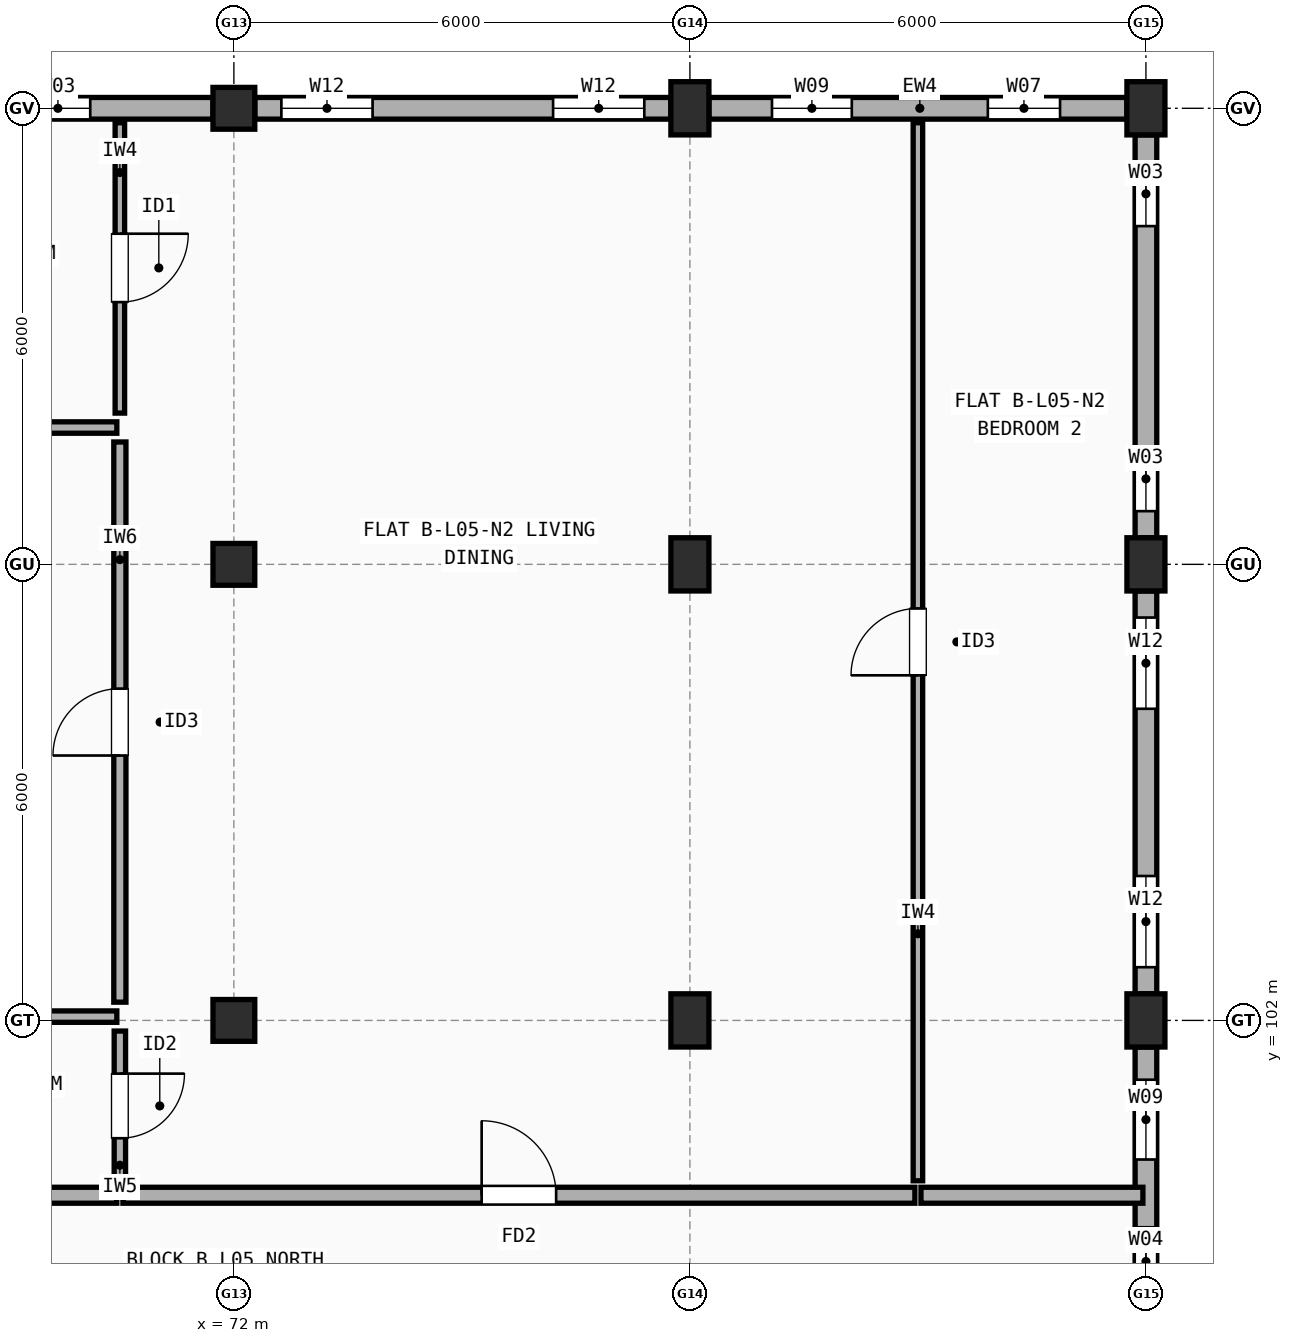
"""IFC4 building model, lengths in metres.
Left out: names, types, materials, properties, quantities, classifications, styles, units other than length and angle.
Written with IfcOpenShell. Run it as: python <this file> out.ifc"""

import sys

from ifc_helpers import new_model, si_unit, direction, frame, frame_2d, origin, origin_2d, place, context, subcontext, project, spatial, rectangle, extrude, element, fill, save


model = new_model("IFC4")
c1 = context("Model", 3, precision=1e-05, world=origin(), true_north=direction((0.0, 1.0)))
c2 = subcontext(c1, "Body", "Model", "MODEL_VIEW")
j1 = project(units=[si_unit("LENGTHUNIT", "METRE"), si_unit("PLANEANGLEUNIT", "RADIAN")], contexts=[c1])
p1 = place(None, origin())
s1 = spatial("IfcSite", under=j1, at=p1, CompositionType="ELEMENT")
p2 = place(p1, origin())
s2 = spatial("IfcBuilding", under=s1, at=p2, CompositionType="ELEMENT")
p3 = place(p2, frame((0.0, 0.0, 17.3)))
s3 = spatial("IfcBuildingStorey", under=s2, at=p3, CompositionType="ELEMENT", Elevation=17.3)
for number, where, z_axis, x_axis in (
    (1, (72.0, 102.0, 0.0), (0.0, 0.0, 1.0), (1.0, 0.0, 0.0)),
    (2, (72.0, 108.0, 0.0), (0.0, 0.0, 1.0), (1.0, 0.0, 0.0)),
    (3, (72.0, 114.0, 0.0), (0.0, 0.0, 1.0), (1.0, 0.0, 0.0)),
):
    element("IfcColumn", number, at=place(p3, frame(where, z_axis=z_axis, x_axis=x_axis)), inside=s3, PredefinedType="COLUMN", context=c2, shape_type="SweptSolid", body=[
        extrude(rectangle(XDim=0.55, YDim=0.55, at=origin_2d()), origin(), (0.0, 0.0, 1.0), 2.965),
    ])
for number, where, z_axis, x_axis in (
    (4, (78.0, 102.0, 0.0), (0.0, 0.0, 1.0), (1.0, 0.0, 0.0)),
    (5, (78.0, 108.0, 0.0), (0.0, 0.0, 1.0), (1.0, 0.0, 0.0)),
    (6, (78.0, 114.0, 0.0), (0.0, 0.0, 1.0), (1.0, 0.0, 0.0)),
    (7, (84.0, 102.0, 0.0), (0.0, 0.0, 1.0), (1.0, 0.0, 0.0)),
    (8, (84.0, 108.0, 0.0), (0.0, 0.0, 1.0), (1.0, 0.0, 0.0)),
    (9, (84.0, 114.0, 0.0), (0.0, 0.0, 1.0), (1.0, 0.0, 0.0)),
):
    element("IfcColumn", number, at=place(p3, frame(where, z_axis=z_axis, x_axis=x_axis)), inside=s3, PredefinedType="COLUMN", context=c2, shape_type="SweptSolid", body=[
        extrude(rectangle(XDim=0.5, YDim=0.7, at=origin_2d()), origin(), (0.0, 0.0, 1.0), 2.965),
    ])
p4 = place(p3, frame((84.0, 96.35, 0.0), z_axis=(0.0, 0.0, 1.0), x_axis=(0.0, 1.0, 0.0)))
e10 = element("IfcWall", 10, at=p4, inside=s3, PredefinedType="STANDARD", context=c2, shape_type="SweptSolid", body=[
    extrude(rectangle(XDim=5.3, YDim=0.285, at=frame_2d((2.65, 0.0))), origin(), (0.0, 0.0, 1.0), 2.447),
])
p5 = place(p4, frame((2.029, 0.0, 0.9)))
e11 = element("IfcOpeningElement", 11, at=p5, cuts=e10, PredefinedType="OPENING", context=c2, shape_type="SweptSolid", body=[
    extrude(rectangle(XDim=0.9, YDim=1.3, at=frame_2d((0.45, 0.65))), frame((0.0, 0.152, 0.0), z_axis=(0.0, -1.0, 0.0), x_axis=(1.0, 0.0, 0.0)), (0.0, 0.0, 1.0), 0.305),
])
p6 = place(p4, frame((3.82, 0.0, 0.9)))
e12 = element("IfcOpeningElement", 12, at=p6, cuts=e10, PredefinedType="OPENING", context=c2, shape_type="SweptSolid", body=[
    extrude(rectangle(XDim=1.05, YDim=1.35, at=frame_2d((0.525, 0.675))), frame((0.0, 0.152, 0.0), z_axis=(0.0, -1.0, 0.0), x_axis=(1.0, 0.0, 0.0)), (0.0, 0.0, 1.0), 0.305),
])
p7 = place(p3, frame((84.0, 102.35, 0.0), z_axis=(0.0, 0.0, 1.0), x_axis=(0.0, 1.0, 0.0)))
e13 = element("IfcWall", 13, at=p7, inside=s3, PredefinedType="STANDARD", context=c2, shape_type="SweptSolid", body=[
    extrude(rectangle(XDim=5.3, YDim=0.285, at=frame_2d((2.65, 0.0))), origin(), (0.0, 0.0, 1.0), 2.447),
])
p8 = place(p7, frame((0.35, 0.0, 0.9)))
e14 = element("IfcOpeningElement", 14, at=p8, cuts=e13, PredefinedType="OPENING", context=c2, shape_type="SweptSolid", body=[
    extrude(rectangle(XDim=1.2, YDim=1.35, at=frame_2d((0.6, 0.675))), frame((0.0, 0.152, 0.0), z_axis=(0.0, -1.0, 0.0), x_axis=(1.0, 0.0, 0.0)), (0.0, 0.0, 1.0), 0.305),
])
p9 = place(p7, frame((3.75, 0.0, 0.9)))
e15 = element("IfcOpeningElement", 15, at=p9, cuts=e13, PredefinedType="OPENING", context=c2, shape_type="SweptSolid", body=[
    extrude(rectangle(XDim=1.2, YDim=1.35, at=frame_2d((0.6, 0.675))), frame((0.0, 0.152, 0.0), z_axis=(0.0, -1.0, 0.0), x_axis=(1.0, 0.0, 0.0)), (0.0, 0.0, 1.0), 0.305),
])
p10 = place(p3, frame((84.0, 108.35, 0.0), z_axis=(0.0, 0.0, 1.0), x_axis=(0.0, 1.0, 0.0)))
e16 = element("IfcWall", 16, at=p10, inside=s3, PredefinedType="STANDARD", context=c2, shape_type="SweptSolid", body=[
    extrude(rectangle(XDim=5.3, YDim=0.285, at=frame_2d((2.65, 0.0))), origin(), (0.0, 0.0, 1.0), 2.447),
])
p11 = place(p10, frame((0.35, 0.0, 0.9)))
e17 = element("IfcOpeningElement", 17, at=p11, cuts=e16, PredefinedType="OPENING", context=c2, shape_type="SweptSolid", body=[
    extrude(rectangle(XDim=0.85, YDim=1.25, at=frame_2d((0.425, 0.625))), frame((0.0, 0.152, 0.0), z_axis=(0.0, -1.0, 0.0), x_axis=(1.0, 0.0, 0.0)), (0.0, 0.0, 1.0), 0.305),
])
p12 = place(p10, frame((4.1, 0.0, 0.9)))
e18 = element("IfcOpeningElement", 18, at=p12, cuts=e16, PredefinedType="OPENING", context=c2, shape_type="SweptSolid", body=[
    extrude(rectangle(XDim=0.85, YDim=1.25, at=frame_2d((0.425, 0.625))), frame((0.0, 0.152, 0.0), z_axis=(0.0, -1.0, 0.0), x_axis=(1.0, 0.0, 0.0)), (0.0, 0.0, 1.0), 0.305),
])
p13 = place(p3, frame((83.75, 114.0, 0.0), z_axis=(0.0, 0.0, 1.0), x_axis=(-1.0, 0.0, 0.0)))
e19 = element("IfcWall", 19, at=p13, inside=s3, PredefinedType="STANDARD", context=c2, shape_type="SweptSolid", body=[
    extrude(rectangle(XDim=5.5, YDim=0.285, at=frame_2d((2.75, 0.0))), origin(), (0.0, 0.0, 1.0), 2.447),
])
p14 = place(p13, frame((0.88, 0.0, 0.9)))
e20 = element("IfcOpeningElement", 20, at=p14, cuts=e19, PredefinedType="OPENING", context=c2, shape_type="SweptSolid", body=[
    extrude(rectangle(XDim=0.95, YDim=1.35, at=frame_2d((0.475, 0.675))), frame((0.0, 0.152, 0.0), z_axis=(0.0, -1.0, 0.0), x_axis=(1.0, 0.0, 0.0)), (0.0, 0.0, 1.0), 0.305),
])
p15 = place(p13, frame((3.62, 0.0, 0.9)))
e21 = element("IfcOpeningElement", 21, at=p15, cuts=e19, PredefinedType="OPENING", context=c2, shape_type="SweptSolid", body=[
    extrude(rectangle(XDim=1.05, YDim=1.35, at=frame_2d((0.525, 0.675))), frame((0.0, 0.152, 0.0), z_axis=(0.0, -1.0, 0.0), x_axis=(1.0, 0.0, 0.0)), (0.0, 0.0, 1.0), 0.305),
])
p16 = place(p3, frame((77.75, 114.0, 0.0), z_axis=(0.0, 0.0, 1.0), x_axis=(-1.0, 0.0, 0.0)))
e22 = element("IfcWall", 22, at=p16, inside=s3, PredefinedType="STANDARD", context=c2, shape_type="SweptSolid", body=[
    extrude(rectangle(XDim=5.475, YDim=0.285, at=frame_2d((2.738, 0.0))), origin(), (0.0, 0.0, 1.0), 2.447),
])
p17 = place(p16, frame((0.35, 0.0, 0.9)))
e23 = element("IfcOpeningElement", 23, at=p17, cuts=e22, PredefinedType="OPENING", context=c2, shape_type="SweptSolid", body=[
    extrude(rectangle(XDim=1.2, YDim=1.35, at=frame_2d((0.6, 0.675))), frame((0.0, 0.152, 0.0), z_axis=(0.0, -1.0, 0.0), x_axis=(1.0, 0.0, 0.0)), (0.0, 0.0, 1.0), 0.305),
])
p18 = place(p16, frame((3.925, 0.0, 0.9)))
e24 = element("IfcOpeningElement", 24, at=p18, cuts=e22, PredefinedType="OPENING", context=c2, shape_type="SweptSolid", body=[
    extrude(rectangle(XDim=1.2, YDim=1.35, at=frame_2d((0.6, 0.675))), frame((0.0, 0.152, 0.0), z_axis=(0.0, -1.0, 0.0), x_axis=(1.0, 0.0, 0.0)), (0.0, 0.0, 1.0), 0.305),
])
p19 = place(p3, frame((71.725, 114.0, 0.0), z_axis=(0.0, 0.0, 1.0), x_axis=(-1.0, 0.0, 0.0)))
e25 = element("IfcWall", 25, at=p19, inside=s3, PredefinedType="STANDARD", context=c2, shape_type="SweptSolid", body=[
    extrude(rectangle(XDim=5.45, YDim=0.285, at=frame_2d((2.725, 0.0))), origin(), (0.0, 0.0, 1.0), 2.447),
])
p20 = place(p19, frame((1.615, 0.0, 0.9)))
e26 = element("IfcOpeningElement", 26, at=p20, cuts=e25, PredefinedType="OPENING", context=c2, shape_type="SweptSolid", body=[
    extrude(rectangle(XDim=0.85, YDim=1.25, at=frame_2d((0.425, 0.625))), frame((0.0, 0.152, 0.0), z_axis=(0.0, -1.0, 0.0), x_axis=(1.0, 0.0, 0.0)), (0.0, 0.0, 1.0), 0.305),
])
p21 = place(p19, frame((4.25, 0.0, 0.9)))
e27 = element("IfcOpeningElement", 27, at=p21, cuts=e25, PredefinedType="OPENING", context=c2, shape_type="SweptSolid", body=[
    extrude(rectangle(XDim=0.85, YDim=1.25, at=frame_2d((0.425, 0.625))), frame((0.0, 0.152, 0.0), z_axis=(0.0, -1.0, 0.0), x_axis=(1.0, 0.0, 0.0)), (0.0, 0.0, 1.0), 0.305),
])
p22 = place(p3, frame((66.04, 99.7, 0.0), z_axis=(0.0, 0.0, 1.0), x_axis=(1.0, 0.0, 0.0)))
e28 = element("IfcWall", 28, at=p22, inside=s3, PredefinedType="SOLIDWALL", context=c2, shape_type="SweptSolid", body=[
    extrude(rectangle(XDim=4.42, YDim=0.21, at=frame_2d((2.21, 0.0))), origin(), (0.0, 0.0, 1.0), 2.965),
])
p23 = place(p3, frame((70.54, 99.7, 0.0), z_axis=(0.0, 0.0, 1.0), x_axis=(1.0, 0.0, 0.0)))
e29 = element("IfcWall", 29, at=p23, inside=s3, PredefinedType="SOLIDWALL", context=c2, shape_type="SweptSolid", body=[
    extrude(rectangle(XDim=10.42, YDim=0.21, at=frame_2d((5.21, 0.0))), origin(), (0.0, 0.0, 1.0), 2.447),
])
p24 = place(p23, frame((4.72, 0.0, 0.0)))
e30 = element("IfcOpeningElement", 30, at=p24, cuts=e29, PredefinedType="OPENING", context=c2, shape_type="SweptSolid", body=[
    extrude(rectangle(XDim=0.98, YDim=2.15, at=frame_2d((0.49, 1.075))), frame((0.0, 0.115, 0.0), z_axis=(0.0, -1.0, 0.0), x_axis=(1.0, 0.0, 0.0)), (0.0, 0.0, 1.0), 0.23),
])
p25 = place(p3, frame((70.5, 109.99, 0.0), z_axis=(0.0, 0.0, 1.0), x_axis=(0.0, 1.0, 0.0)))
e31 = element("IfcWall", 31, at=p25, inside=s3, PredefinedType="PARTITIONING", context=c2, shape_type="SweptSolid", body=[
    extrude(rectangle(XDim=3.82, YDim=0.125, at=frame_2d((1.91, 0.0))), origin(), (0.0, 0.0, 1.0), 2.965),
])
p26 = place(p25, frame((1.46, 0.0, 0.0)))
e32 = element("IfcOpeningElement", 32, at=p26, cuts=e31, PredefinedType="OPENING", context=c2, shape_type="SweptSolid", body=[
    extrude(rectangle(XDim=0.9, YDim=2.1, at=frame_2d((0.45, 1.05))), frame((0.0, 0.073, 0.0), z_axis=(0.0, -1.0, 0.0), x_axis=(1.0, 0.0, 0.0)), (0.0, 0.0, 1.0), 0.145),
])
p27 = place(p3, frame((70.5, 102.24, 0.0), z_axis=(0.0, 0.0, 1.0), x_axis=(0.0, 1.0, 0.0)))
e33 = element("IfcWall", 33, at=p27, inside=s3, PredefinedType="PLUMBINGWALL", context=c2, shape_type="SweptSolid", body=[
    extrude(rectangle(XDim=7.37, YDim=0.16, at=frame_2d((3.685, 0.0))), origin(), (0.0, 0.0, 1.0), 2.447),
])
p28 = place(p27, frame((3.245, 0.0, 0.0)))
e34 = element("IfcOpeningElement", 34, at=p28, cuts=e33, PredefinedType="OPENING", context=c2, shape_type="SweptSolid", body=[
    extrude(rectangle(XDim=0.88, YDim=2.1, at=frame_2d((0.44, 1.05))), frame((0.0, 0.09, 0.0), z_axis=(0.0, -1.0, 0.0), x_axis=(1.0, 0.0, 0.0)), (0.0, 0.0, 1.0), 0.18),
])
p29 = place(p3, frame((70.5, 99.89, 0.0), z_axis=(0.0, 0.0, 1.0), x_axis=(0.0, 1.0, 0.0)))
e35 = element("IfcWall", 35, at=p29, inside=s3, PredefinedType="PARTITIONING", context=c2, shape_type="SweptSolid", body=[
    extrude(rectangle(XDim=1.97, YDim=0.15, at=frame_2d((0.985, 0.0))), origin(), (0.0, 0.0, 1.0), 2.965),
])
p30 = place(p29, frame((0.56, 0.0, 0.0)))
e36 = element("IfcOpeningElement", 36, at=p30, cuts=e35, PredefinedType="OPENING", context=c2, shape_type="SweptSolid", body=[
    extrude(rectangle(XDim=0.85, YDim=2.1, at=frame_2d((0.425, 1.05))), frame((0.0, 0.085, 0.0), z_axis=(0.0, -1.0, 0.0), x_axis=(1.0, 0.0, 0.0)), (0.0, 0.0, 1.0), 0.17),
])
p31 = place(p3, frame((66.04, 109.8, 0.0), z_axis=(0.0, 0.0, 1.0), x_axis=(1.0, 0.0, 0.0)))
e37 = element("IfcWall", 37, at=p31, inside=s3, PredefinedType="PARTITIONING", context=c2, shape_type="SweptSolid", body=[
    extrude(rectangle(XDim=4.42, YDim=0.15, at=frame_2d((2.21, 0.0))), origin(), (0.0, 0.0, 1.0), 2.458),
])
p32 = place(p3, frame((66.36, 102.05, 0.0), z_axis=(0.0, 0.0, 1.0), x_axis=(1.0, 0.0, 0.0)))
e38 = element("IfcWall", 38, at=p32, inside=s3, PredefinedType="PARTITIONING", context=c2, shape_type="SweptSolid", body=[
    extrude(rectangle(XDim=4.1, YDim=0.15, at=frame_2d((2.05, 0.0))), origin(), (0.0, 0.0, 1.0), 2.447),
])
p33 = place(p3, frame((81.04, 99.7, 0.0), z_axis=(0.0, 0.0, 1.0), x_axis=(1.0, 0.0, 0.0)))
e39 = element("IfcWall", 39, at=p33, inside=s3, PredefinedType="SOLIDWALL", context=c2, shape_type="SweptSolid", body=[
    extrude(rectangle(XDim=2.92, YDim=0.21, at=frame_2d((1.46, 0.0))), origin(), (0.0, 0.0, 1.0), 2.447),
])
p34 = place(p3, frame((81.0, 99.89, 0.0), z_axis=(0.0, 0.0, 1.0), x_axis=(0.0, 1.0, 0.0)))
e40 = element("IfcWall", 40, at=p34, inside=s3, PredefinedType="PARTITIONING", context=c2, shape_type="SweptSolid", body=[
    extrude(rectangle(XDim=13.92, YDim=0.125, at=frame_2d((6.96, 0.0))), origin(), (0.0, 0.0, 1.0), 2.447),
])
p35 = place(p34, frame((6.65, 0.0, 0.0)))
e41 = element("IfcOpeningElement", 41, at=p35, cuts=e40, PredefinedType="OPENING", context=c2, shape_type="SweptSolid", body=[
    extrude(rectangle(XDim=0.88, YDim=2.1, at=frame_2d((0.44, 1.05))), frame((0.0, 0.073, 0.0), z_axis=(0.0, -1.0, 0.0), x_axis=(1.0, 0.0, 0.0)), (0.0, 0.0, 1.0), 0.145),
])
p36 = place(p5, origin())
e42 = element("IfcWindow", 42, at=p36, inside=s3, PartitioningType="SINGLE_PANEL", PredefinedType="WINDOW", context=c2, shape_type="SweptSolid", body=[
    extrude(rectangle(XDim=0.9, YDim=1.3, at=frame_2d((0.45, 0.65))), frame((0.0, 0.03, 0.0), z_axis=(0.0, -1.0, 0.0), x_axis=(1.0, 0.0, 0.0)), (0.0, 0.0, 1.0), 0.06),
])
fill(e11, e42)
p37 = place(p6, origin())
e43 = element("IfcWindow", 43, at=p37, inside=s3, PartitioningType="SINGLE_PANEL", PredefinedType="WINDOW", context=c2, shape_type="SweptSolid", body=[
    extrude(rectangle(XDim=1.05, YDim=1.35, at=frame_2d((0.525, 0.675))), frame((0.0, 0.03, 0.0), z_axis=(0.0, -1.0, 0.0), x_axis=(1.0, 0.0, 0.0)), (0.0, 0.0, 1.0), 0.06),
])
fill(e12, e43)
p38 = place(p8, origin())
e44 = element("IfcWindow", 44, at=p38, inside=s3, PartitioningType="SINGLE_PANEL", PredefinedType="WINDOW", context=c2, shape_type="SweptSolid", body=[
    extrude(rectangle(XDim=1.2, YDim=1.35, at=frame_2d((0.6, 0.675))), frame((0.0, 0.03, 0.0), z_axis=(0.0, -1.0, 0.0), x_axis=(1.0, 0.0, 0.0)), (0.0, 0.0, 1.0), 0.06),
])
fill(e14, e44)
p39 = place(p9, origin())
e45 = element("IfcWindow", 45, at=p39, inside=s3, PartitioningType="SINGLE_PANEL", PredefinedType="WINDOW", context=c2, shape_type="SweptSolid", body=[
    extrude(rectangle(XDim=1.2, YDim=1.35, at=frame_2d((0.6, 0.675))), frame((0.0, 0.03, 0.0), z_axis=(0.0, -1.0, 0.0), x_axis=(1.0, 0.0, 0.0)), (0.0, 0.0, 1.0), 0.06),
])
fill(e15, e45)
p40 = place(p11, origin())
e46 = element("IfcWindow", 46, at=p40, inside=s3, PartitioningType="SINGLE_PANEL", PredefinedType="WINDOW", context=c2, shape_type="SweptSolid", body=[
    extrude(rectangle(XDim=0.85, YDim=1.25, at=frame_2d((0.425, 0.625))), frame((0.0, 0.03, 0.0), z_axis=(0.0, -1.0, 0.0), x_axis=(1.0, 0.0, 0.0)), (0.0, 0.0, 1.0), 0.06),
])
fill(e17, e46)
p41 = place(p12, origin())
e47 = element("IfcWindow", 47, at=p41, inside=s3, PartitioningType="SINGLE_PANEL", PredefinedType="WINDOW", context=c2, shape_type="SweptSolid", body=[
    extrude(rectangle(XDim=0.85, YDim=1.25, at=frame_2d((0.425, 0.625))), frame((0.0, 0.03, 0.0), z_axis=(0.0, -1.0, 0.0), x_axis=(1.0, 0.0, 0.0)), (0.0, 0.0, 1.0), 0.06),
])
fill(e18, e47)
p42 = place(p14, origin())
e48 = element("IfcWindow", 48, at=p42, inside=s3, PartitioningType="SINGLE_PANEL", PredefinedType="WINDOW", context=c2, shape_type="SweptSolid", body=[
    extrude(rectangle(XDim=0.95, YDim=1.35, at=frame_2d((0.475, 0.675))), frame((0.0, 0.03, 0.0), z_axis=(0.0, -1.0, 0.0), x_axis=(1.0, 0.0, 0.0)), (0.0, 0.0, 1.0), 0.06),
])
fill(e20, e48)
p43 = place(p15, origin())
e49 = element("IfcWindow", 49, at=p43, inside=s3, PartitioningType="SINGLE_PANEL", PredefinedType="WINDOW", context=c2, shape_type="SweptSolid", body=[
    extrude(rectangle(XDim=1.05, YDim=1.35, at=frame_2d((0.525, 0.675))), frame((0.0, 0.03, 0.0), z_axis=(0.0, -1.0, 0.0), x_axis=(1.0, 0.0, 0.0)), (0.0, 0.0, 1.0), 0.06),
])
fill(e21, e49)
p44 = place(p17, origin())
e50 = element("IfcWindow", 50, at=p44, inside=s3, PartitioningType="SINGLE_PANEL", PredefinedType="WINDOW", context=c2, shape_type="SweptSolid", body=[
    extrude(rectangle(XDim=1.2, YDim=1.35, at=frame_2d((0.6, 0.675))), frame((0.0, 0.03, 0.0), z_axis=(0.0, -1.0, 0.0), x_axis=(1.0, 0.0, 0.0)), (0.0, 0.0, 1.0), 0.06),
])
fill(e23, e50)
p45 = place(p18, origin())
e51 = element("IfcWindow", 51, at=p45, inside=s3, PartitioningType="SINGLE_PANEL", PredefinedType="WINDOW", context=c2, shape_type="SweptSolid", body=[
    extrude(rectangle(XDim=1.2, YDim=1.35, at=frame_2d((0.6, 0.675))), frame((0.0, 0.03, 0.0), z_axis=(0.0, -1.0, 0.0), x_axis=(1.0, 0.0, 0.0)), (0.0, 0.0, 1.0), 0.06),
])
fill(e24, e51)
p46 = place(p20, origin())
e52 = element("IfcWindow", 52, at=p46, inside=s3, PartitioningType="SINGLE_PANEL", PredefinedType="WINDOW", context=c2, shape_type="SweptSolid", body=[
    extrude(rectangle(XDim=0.85, YDim=1.25, at=frame_2d((0.425, 0.625))), frame((0.0, 0.03, 0.0), z_axis=(0.0, -1.0, 0.0), x_axis=(1.0, 0.0, 0.0)), (0.0, 0.0, 1.0), 0.06),
])
fill(e26, e52)
p47 = place(p24, origin())
e53 = element("IfcDoor", 53, at=p47, inside=s3, OperationType="SINGLE_SWING_LEFT", PredefinedType="DOOR", context=c2, shape_type="SweptSolid", body=[
    extrude(rectangle(XDim=0.98, YDim=2.15, at=frame_2d((0.49, 1.075))), frame((0.0, 0.025, 0.0), z_axis=(0.0, -1.0, 0.0), x_axis=(1.0, 0.0, 0.0)), (0.0, 0.0, 1.0), 0.05),
])
fill(e30, e53)
p48 = place(p26, origin())
e54 = element("IfcDoor", 54, at=p48, inside=s3, OperationType="SINGLE_SWING_RIGHT", PredefinedType="DOOR", context=c2, shape_type="SweptSolid", body=[
    extrude(rectangle(XDim=0.9, YDim=2.1, at=frame_2d((0.45, 1.05))), frame((0.0, 0.025, 0.0), z_axis=(0.0, -1.0, 0.0), x_axis=(1.0, 0.0, 0.0)), (0.0, 0.0, 1.0), 0.05),
])
fill(e32, e54)
p49 = place(p28, origin())
e55 = element("IfcDoor", 55, at=p49, inside=s3, OperationType="SINGLE_SWING_LEFT", PredefinedType="DOOR", context=c2, shape_type="SweptSolid", body=[
    extrude(rectangle(XDim=0.88, YDim=2.1, at=frame_2d((0.44, 1.05))), frame((0.0, 0.025, 0.0), z_axis=(0.0, -1.0, 0.0), x_axis=(1.0, 0.0, 0.0)), (0.0, 0.0, 1.0), 0.05),
])
fill(e34, e55)
p50 = place(p30, origin())
e56 = element("IfcDoor", 56, at=p50, inside=s3, OperationType="SINGLE_SWING_RIGHT", PredefinedType="DOOR", context=c2, shape_type="SweptSolid", body=[
    extrude(rectangle(XDim=0.85, YDim=2.1, at=frame_2d((0.425, 1.05))), frame((0.0, 0.025, 0.0), z_axis=(0.0, -1.0, 0.0), x_axis=(1.0, 0.0, 0.0)), (0.0, 0.0, 1.0), 0.05),
])
fill(e36, e56)
p51 = place(p35, origin())
e57 = element("IfcDoor", 57, at=p51, inside=s3, OperationType="SINGLE_SWING_LEFT", PredefinedType="DOOR", context=c2, shape_type="SweptSolid", body=[
    extrude(rectangle(XDim=0.88, YDim=2.1, at=frame_2d((0.44, 1.05))), frame((0.0, 0.025, 0.0), z_axis=(0.0, -1.0, 0.0), x_axis=(1.0, 0.0, 0.0)), (0.0, 0.0, 1.0), 0.05),
])
fill(e41, e57)
save(model, sys.argv[1])
